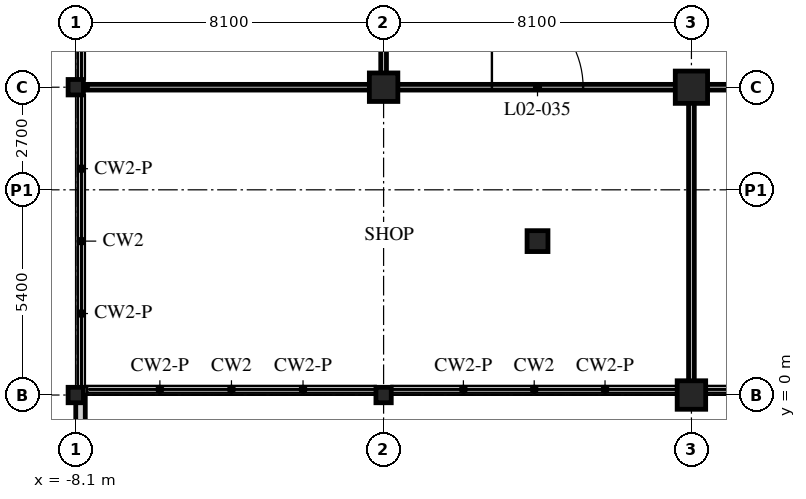
"""IFC4 building model, lengths in metres.
Left out: names, types, materials, properties, quantities, classifications, styles, units other than length and angle.
Written with IfcOpenShell. Run it as: python <this file> out.ifc"""

import sys

from ifc_helpers import new_model, si_unit, direction, frame, frame_2d, origin, origin_2d, place, context, subcontext, project, spatial, rectangle, hollow_rectangle, i_section, extrude, element, fill, save


model = new_model("IFC4")
c1 = context("Model", 3, precision=1e-05, world=origin(), true_north=direction((0.0, 1.0)))
c2 = subcontext(c1, "Body", "Model", "MODEL_VIEW")
j1 = project(units=[si_unit("LENGTHUNIT", "METRE"), si_unit("PLANEANGLEUNIT", "RADIAN")], contexts=[c1])
p1 = place(None, origin())
s1 = spatial("IfcSite", under=j1, at=p1, CompositionType="ELEMENT")
p2 = place(p1, origin())
s2 = spatial("IfcBuilding", under=s1, at=p2, CompositionType="ELEMENT")
p3 = place(p2, frame((0.0, 0.0, 11.4)))
s3 = spatial("IfcBuildingStorey", under=s2, at=p3, CompositionType="ELEMENT", Elevation=11.4)
for number, where, z_axis, x_axis in (
    (1, (-8.1, 0.0, 0.0), (0.0, 0.0, 1.0), (1.0, 0.0, 0.0)),
    (2, (-8.1, 8.1, 0.0), (0.0, 0.0, 1.0), (1.0, 0.0, 0.0)),
    (3, (0.0, 0.0, 0.0), (0.0, 0.0, 1.0), (1.0, 0.0, 0.0)),
):
    element("IfcColumn", number, at=place(p3, frame(where, z_axis=z_axis, x_axis=x_axis)), inside=s3, PredefinedType="COLUMN", context=c2, shape_type="SweptSolid", body=[
        extrude(i_section(OverallWidth=0.403, OverallDepth=0.406, WebThickness=0.027, FlangeThickness=0.043, FilletRadius=0.015, at=origin_2d()), origin(), (0.0, 0.0, 1.0), 5.4),
    ])
p4 = place(p3, frame((0.0, 8.1, 0.0), z_axis=(0.0, 0.0, 1.0), x_axis=(1.0, 0.0, 0.0)))
e4 = element("IfcColumn", 4, at=p4, inside=s3, PredefinedType="COLUMN", context=c2, shape_type="SweptSolid", body=[
    extrude(hollow_rectangle(XDim=0.75, YDim=0.75, WallThickness=0.07, at=origin_2d()), origin(), (0.0, 0.0, 1.0), 5.4),
])
p5 = place(p3, frame((4.05, 4.05, 0.0), z_axis=(0.0, 0.0, 1.0), x_axis=(1.0, 0.0, 0.0)))
e5 = element("IfcColumn", 5, at=p5, inside=s3, PredefinedType="COLUMN", context=c2, shape_type="SweptSolid", body=[
    extrude(hollow_rectangle(XDim=0.55, YDim=0.55, WallThickness=0.05, at=origin_2d()), origin(), (0.0, 0.0, 1.0), 5.4),
])
p6 = place(p3, frame((8.1, 0.0, 0.0), z_axis=(0.0, 0.0, 1.0), x_axis=(1.0, 0.0, 0.0)))
e6 = element("IfcColumn", 6, at=p6, inside=s3, PredefinedType="COLUMN", context=c2, shape_type="SweptSolid", body=[
    extrude(hollow_rectangle(XDim=0.75, YDim=0.75, WallThickness=0.07, at=origin_2d()), origin(), (0.0, 0.0, 1.0), 5.4),
])
p7 = place(p3, frame((8.1, 8.1, 0.0), z_axis=(0.0, 0.0, 1.0), x_axis=(1.0, 0.0, 0.0)))
e7 = element("IfcColumn", 7, at=p7, inside=s3, PredefinedType="COLUMN", context=c2, shape_type="SweptSolid", body=[
    extrude(hollow_rectangle(XDim=0.85, YDim=0.85, WallThickness=0.085, at=origin_2d()), origin(), (0.0, 0.0, 1.0), 5.4),
])
p8 = place(p3, frame((-7.975, 0.0, 0.0), z_axis=(0.0, 0.0, 1.0), x_axis=(0.0, -1.0, 0.0)))
e8 = element("IfcWall", 8, at=p8, inside=s3, PredefinedType="PARAPET", context=c2, shape_type="SweptSolid", body=[
    extrude(rectangle(XDim=8.1, YDim=0.25, at=frame_2d((4.05, 0.0))), origin(), (0.0, 0.0, 1.0), 1.38),
])
p9 = place(p3, frame((0.0, 8.1, 0.0), z_axis=(0.0, 0.0, 1.0), x_axis=(1.0, 0.0, 0.0)))
e9 = element("IfcWall", 9, at=p9, inside=s3, PredefinedType="PARTITIONING", context=c2, shape_type="SweptSolid", body=[
    extrude(rectangle(XDim=56.7, YDim=0.15, at=frame_2d((28.35, 0.0))), origin(), (0.0, 0.0, 1.0), 4.538),
])
p10 = place(p9, frame((17.05, 0.0, 0.0)))
e10 = element("IfcOpeningElement", 10, at=p10, cuts=e9, PredefinedType="OPENING", context=c2, shape_type="SweptSolid", body=[
    extrude(rectangle(XDim=1.8, YDim=2.4, at=frame_2d((0.9, 1.2))), frame((0.0, 0.085, 0.0), z_axis=(0.0, -1.0, 0.0), x_axis=(1.0, 0.0, 0.0)), (0.0, 0.0, 1.0), 0.17),
])
p11 = place(p9, frame((27.15, 0.0, 0.0)))
e11 = element("IfcOpeningElement", 11, at=p11, cuts=e9, PredefinedType="OPENING", context=c2, shape_type="SweptSolid", body=[
    extrude(rectangle(XDim=2.4, YDim=2.7, at=frame_2d((1.2, 1.35))), frame((0.0, 0.085, 0.0), z_axis=(0.0, -1.0, 0.0), x_axis=(1.0, 0.0, 0.0)), (0.0, 0.0, 1.0), 0.17),
])
p12 = place(p9, frame((35.25, 0.0, 0.0)))
e12 = element("IfcOpeningElement", 12, at=p12, cuts=e9, PredefinedType="OPENING", context=c2, shape_type="SweptSolid", body=[
    extrude(rectangle(XDim=2.4, YDim=2.7, at=frame_2d((1.2, 1.35))), frame((0.0, 0.085, 0.0), z_axis=(0.0, -1.0, 0.0), x_axis=(1.0, 0.0, 0.0)), (0.0, 0.0, 1.0), 0.17),
])
p13 = place(p9, frame((43.65, 0.0, 0.0)))
e13 = element("IfcOpeningElement", 13, at=p13, cuts=e9, PredefinedType="OPENING", context=c2, shape_type="SweptSolid", body=[
    extrude(rectangle(XDim=1.8, YDim=2.4, at=frame_2d((0.9, 1.2))), frame((0.0, 0.085, 0.0), z_axis=(0.0, -1.0, 0.0), x_axis=(1.0, 0.0, 0.0)), (0.0, 0.0, 1.0), 0.17),
])
p14 = place(p9, frame((2.85, 0.0, 0.0)))
e14 = element("IfcOpeningElement", 14, at=p14, cuts=e9, PredefinedType="OPENING", context=c2, shape_type="SweptSolid", body=[
    extrude(rectangle(XDim=2.4, YDim=2.7, at=frame_2d((1.2, 1.35))), frame((0.0, 0.085, 0.0), z_axis=(0.0, -1.0, 0.0), x_axis=(1.0, 0.0, 0.0)), (0.0, 0.0, 1.0), 0.17),
])
p15 = place(p9, frame((51.45, 0.0, 0.0)))
e15 = element("IfcOpeningElement", 15, at=p15, cuts=e9, PredefinedType="OPENING", context=c2, shape_type="SweptSolid", body=[
    extrude(rectangle(XDim=2.4, YDim=2.7, at=frame_2d((1.2, 1.35))), frame((0.0, 0.085, 0.0), z_axis=(0.0, -1.0, 0.0), x_axis=(1.0, 0.0, 0.0)), (0.0, 0.0, 1.0), 0.17),
])
p16 = place(p3, frame((0.0, 8.1, 0.0), z_axis=(0.0, 0.0, 1.0), x_axis=(0.0, 1.0, 0.0)))
e16 = element("IfcWall", 16, at=p16, inside=s3, PredefinedType="PARTITIONING", context=c2, shape_type="SweptSolid", body=[
    extrude(rectangle(XDim=36.0, YDim=0.15, at=frame_2d((18.0, 0.0))), origin(), (0.0, 0.0, 1.0), 4.538),
])
p17 = place(p16, frame((2.85, 0.0, 0.0)))
e17 = element("IfcOpeningElement", 17, at=p17, cuts=e16, PredefinedType="OPENING", context=c2, shape_type="SweptSolid", body=[
    extrude(rectangle(XDim=2.4, YDim=2.7, at=frame_2d((1.2, 1.35))), frame((0.0, 0.085, 0.0), z_axis=(0.0, -1.0, 0.0), x_axis=(1.0, 0.0, 0.0)), (0.0, 0.0, 1.0), 0.17),
])
p18 = place(p16, frame((10.95, 0.0, 0.0)))
e18 = element("IfcOpeningElement", 18, at=p18, cuts=e16, PredefinedType="OPENING", context=c2, shape_type="SweptSolid", body=[
    extrude(rectangle(XDim=2.4, YDim=2.7, at=frame_2d((1.2, 1.35))), frame((0.0, 0.085, 0.0), z_axis=(0.0, -1.0, 0.0), x_axis=(1.0, 0.0, 0.0)), (0.0, 0.0, 1.0), 0.17),
])
p19 = place(p16, frame((19.05, 0.0, 0.0)))
e19 = element("IfcOpeningElement", 19, at=p19, cuts=e16, PredefinedType="OPENING", context=c2, shape_type="SweptSolid", body=[
    extrude(rectangle(XDim=2.4, YDim=2.7, at=frame_2d((1.2, 1.35))), frame((0.0, 0.085, 0.0), z_axis=(0.0, -1.0, 0.0), x_axis=(1.0, 0.0, 0.0)), (0.0, 0.0, 1.0), 0.17),
])
p20 = place(p16, frame((27.15, 0.0, 0.0)))
e20 = element("IfcOpeningElement", 20, at=p20, cuts=e16, PredefinedType="OPENING", context=c2, shape_type="SweptSolid", body=[
    extrude(rectangle(XDim=2.4, YDim=2.7, at=frame_2d((1.2, 1.35))), frame((0.0, 0.085, 0.0), z_axis=(0.0, -1.0, 0.0), x_axis=(1.0, 0.0, 0.0)), (0.0, 0.0, 1.0), 0.17),
])
p21 = place(p16, frame((33.225, 0.0, 0.0)))
e21 = element("IfcOpeningElement", 21, at=p21, cuts=e16, PredefinedType="OPENING", context=c2, shape_type="SweptSolid", body=[
    extrude(rectangle(XDim=2.4, YDim=2.7, at=frame_2d((1.2, 1.35))), frame((0.0, 0.085, 0.0), z_axis=(0.0, -1.0, 0.0), x_axis=(1.0, 0.0, 0.0)), (0.0, 0.0, 1.0), 0.17),
])
for number, where, z_axis, x_axis in (
    (22, (-7.8, 8.1, 0.0), (0.0, 0.0, 1.0), (1.0, 0.0, 0.0)),
    (23, (8.1, 8.1, 0.0), (0.0, 0.0, 1.0), (0.0, -1.0, 0.0)),
):
    element("IfcWall", number, at=place(p3, frame(where, z_axis=z_axis, x_axis=x_axis)), inside=s3, PredefinedType="PARTITIONING", context=c2, shape_type="SweptSolid", body=[
        extrude(rectangle(XDim=7.8, YDim=0.15, at=frame_2d((3.9, 0.0))), origin(), (0.0, 0.0, 1.0), 4.538),
    ])
p22 = place(p14, origin())
e24 = element("IfcDoor", 24, at=p22, inside=s3, OperationType="DOUBLE_DOOR_SINGLE_SWING", PredefinedType="DOOR", context=c2, shape_type="SweptSolid", body=[
    extrude(rectangle(XDim=2.4, YDim=2.7, at=frame_2d((1.2, 1.35))), frame((0.0, 0.025, 0.0), z_axis=(0.0, -1.0, 0.0), x_axis=(1.0, 0.0, 0.0)), (0.0, 0.0, 1.0), 0.05),
])
fill(e14, e24)
save(model, sys.argv[1])
